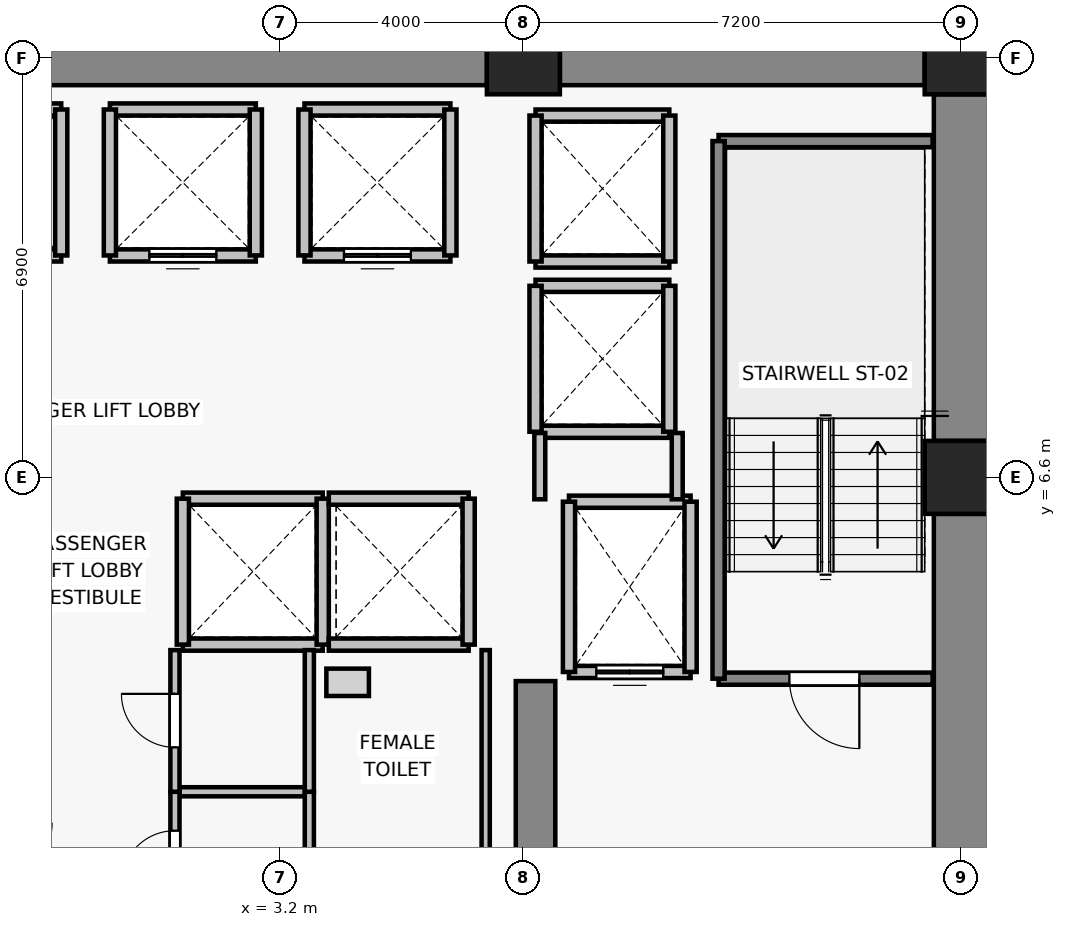
"""IFC4 building model, lengths in metres.
Left out: names, types, materials, properties, quantities, classifications, styles, units other than length and angle.
Written with IfcOpenShell. Run it as: python <this file> out.ifc"""

import sys

from ifc_helpers import new_model, si_unit, direction, frame, frame_2d, origin, origin_2d, place, context, subcontext, project, spatial, rectangle, extrude, source, transform, mapped, element, fill, save


model = new_model("IFC4")
c1 = context("Model", 3, precision=1e-05, world=origin(), true_north=direction((0.0, 1.0)))
c2 = subcontext(c1, "Body", "Model", "MODEL_VIEW")
j1 = project(units=[si_unit("LENGTHUNIT", "METRE"), si_unit("PLANEANGLEUNIT", "RADIAN")], contexts=[c1])
p1 = place(None, origin())
s1 = spatial("IfcSite", under=j1, at=p1, CompositionType="ELEMENT")
p2 = place(p1, origin())
s2 = spatial("IfcBuilding", under=s1, at=p2, CompositionType="ELEMENT")
p3 = place(p2, frame((0.0, 0.0, 30.7)))
s3 = spatial("IfcBuildingStorey", under=s2, at=p3, CompositionType="ELEMENT", Elevation=30.7)
for number, where, z_axis, x_axis in (
    (1, (14.4, 6.6, 0.0), (0.0, 0.0, 1.0), (1.0, 0.0, 0.0)),
    (2, (7.2, 13.5, 0.0), (0.0, 0.0, 1.0), (1.0, 0.0, 0.0)),
    (3, (14.4, 13.5, 0.0), (0.0, 0.0, 1.0), (1.0, 0.0, 0.0)),
):
    element("IfcColumn", number, at=place(p3, frame(where, z_axis=z_axis, x_axis=x_axis)), inside=s3, PredefinedType="COLUMN", context=c2, shape_type="SweptSolid", body=[
        extrude(rectangle(XDim=1.2, YDim=1.2, at=origin_2d()), origin(), (0.0, 0.0, 1.0), 3.3),
    ])
p4 = place(p3, frame((-6.6, 13.5, 0.0), z_axis=(0.0, 0.0, 1.0), x_axis=(1.0, 0.0, 0.0)))
e4 = element("IfcWall", 4, at=p4, inside=s3, PredefinedType="SHEAR", context=c2, shape_type="SweptSolid", body=[
    extrude(rectangle(XDim=13.2, YDim=0.9, at=frame_2d((6.6, 0.0))), origin(), (0.0, 0.0, 1.0), 3.075),
])
p5 = place(p3, frame((7.8, 13.5, 0.0), z_axis=(0.0, 0.0, 1.0), x_axis=(1.0, 0.0, 0.0)))
e5 = element("IfcWall", 5, at=p5, inside=s3, PredefinedType="SHEAR", context=c2, shape_type="SweptSolid", body=[
    extrude(rectangle(XDim=6.0, YDim=0.9, at=frame_2d((3.0, 0.0))), origin(), (0.0, 0.0, 1.0), 3.075),
])
p6 = place(p3, frame((14.4, -0.6, 0.0), z_axis=(0.0, 0.0, 1.0), x_axis=(0.0, 1.0, 0.0)))
e6 = element("IfcWall", 6, at=p6, inside=s3, PredefinedType="SHEAR", context=c2, shape_type="SweptSolid", body=[
    extrude(rectangle(XDim=6.6, YDim=0.9, at=frame_2d((3.3, 0.0))), origin(), (0.0, 0.0, 1.0), 3.075),
])
p7 = place(p3, frame((14.4, 7.2, 0.0), z_axis=(0.0, 0.0, 1.0), x_axis=(0.0, 1.0, 0.0)))
e7 = element("IfcWall", 7, at=p7, inside=s3, PredefinedType="SHEAR", context=c2, shape_type="SweptSolid", body=[
    extrude(rectangle(XDim=5.7, YDim=0.9, at=frame_2d((2.85, 0.0))), origin(), (0.0, 0.0, 1.0), 3.075),
])
p8 = place(p3, frame((7.4, -0.75, 0.0), z_axis=(0.0, 0.0, 1.0), x_axis=(0.0, 1.0, 0.0)))
e8 = element("IfcWall", 8, at=p8, inside=s3, PredefinedType="SHEAR", context=c2, shape_type="SweptSolid", body=[
    extrude(rectangle(XDim=4.0, YDim=0.65, at=frame_2d((2.0, 0.0))), origin(), (0.0, 0.0, 1.0), 3.075),
])
p9 = place(p3, frame((9.95, 3.4, 0.0), z_axis=(0.0, 0.0, 1.0), x_axis=(-1.0, 0.0, 0.0)))
e9 = element("IfcWall", 9, at=p9, inside=s3, PredefinedType="SOLIDWALL", context=c2, shape_type="SweptSolid", body=[
    extrude(rectangle(XDim=2.0, YDim=0.2, at=frame_2d((1.0, 0.0))), origin(), (0.0, 0.0, 1.0), 3.075),
])
p10 = place(p9, frame((0.45, 0.0, 0.0)))
e10 = element("IfcOpeningElement", 10, at=p10, cuts=e9, PredefinedType="OPENING", context=c2, shape_type="SweptSolid", body=[
    extrude(rectangle(XDim=1.1, YDim=2.2, at=frame_2d((0.55, 1.1))), frame((0.0, 0.11, 0.0), z_axis=(0.0, -1.0, 0.0), x_axis=(1.0, 0.0, 0.0)), (0.0, 0.0, 1.0), 0.22),
])
p11 = place(p3, frame((7.95, 6.2, 0.0), z_axis=(0.0, 0.0, 1.0), x_axis=(1.0, 0.0, 0.0)))
e11 = element("IfcWall", 11, at=p11, inside=s3, PredefinedType="SOLIDWALL", context=c2, shape_type="SweptSolid", body=[
    extrude(rectangle(XDim=2.0, YDim=0.2, at=frame_2d((1.0, 0.0))), origin(), (0.0, 0.0, 1.0), 3.075),
])
for number, where, z_axis, x_axis in (
    (12, (7.95, 3.4, 0.0), (0.0, 0.0, 1.0), (0.0, 1.0, 0.0)),
    (13, (9.95, 6.2, 0.0), (0.0, 0.0, 1.0), (0.0, -1.0, 0.0)),
):
    element("IfcWall", number, at=place(p3, frame(where, z_axis=z_axis, x_axis=x_axis)), inside=s3, PredefinedType="SOLIDWALL", context=c2, shape_type="SweptSolid", body=[
        extrude(rectangle(XDim=2.8, YDim=0.2, at=frame_2d((1.4, 0.0))), origin(), (0.0, 0.0, 1.0), 3.075),
    ])
p12 = place(p3, frame((-0.4, 10.25, 0.0), z_axis=(0.0, 0.0, 1.0), x_axis=(-1.0, 0.0, 0.0)))
e14 = element("IfcWall", 14, at=p12, inside=s3, PredefinedType="SOLIDWALL", context=c2, shape_type="SweptSolid", body=[
    extrude(rectangle(XDim=2.4, YDim=0.2, at=frame_2d((1.2, 0.0))), origin(), (0.0, 0.0, 1.0), 3.075),
])
p13 = place(p12, frame((0.65, 0.0, 0.0)))
e15 = element("IfcOpeningElement", 15, at=p13, cuts=e14, PredefinedType="OPENING", context=c2, shape_type="SweptSolid", body=[
    extrude(rectangle(XDim=1.1, YDim=2.2, at=frame_2d((0.55, 1.1))), frame((0.0, 0.11, 0.0), z_axis=(0.0, -1.0, 0.0), x_axis=(1.0, 0.0, 0.0)), (0.0, 0.0, 1.0), 0.22),
])
p14 = place(p3, frame((-2.8, 12.65, 0.0), z_axis=(0.0, 0.0, 1.0), x_axis=(1.0, 0.0, 0.0)))
e16 = element("IfcWall", 16, at=p14, inside=s3, PredefinedType="SOLIDWALL", context=c2, shape_type="SweptSolid", body=[
    extrude(rectangle(XDim=2.4, YDim=0.2, at=frame_2d((1.2, 0.0))), origin(), (0.0, 0.0, 1.0), 3.075),
])
p15 = place(p3, frame((-0.4, 12.65, 0.0), z_axis=(0.0, 0.0, 1.0), x_axis=(0.0, -1.0, 0.0)))
e17 = element("IfcWall", 17, at=p15, inside=s3, PredefinedType="SOLIDWALL", context=c2, shape_type="SweptSolid", body=[
    extrude(rectangle(XDim=2.4, YDim=0.2, at=frame_2d((1.2, 0.0))), origin(), (0.0, 0.0, 1.0), 3.075),
])
p16 = place(p3, frame((2.8, 10.25, 0.0), z_axis=(0.0, 0.0, 1.0), x_axis=(-1.0, 0.0, 0.0)))
e18 = element("IfcWall", 18, at=p16, inside=s3, PredefinedType="SOLIDWALL", context=c2, shape_type="SweptSolid", body=[
    extrude(rectangle(XDim=2.4, YDim=0.2, at=frame_2d((1.2, 0.0))), origin(), (0.0, 0.0, 1.0), 3.075),
])
p17 = place(p16, frame((0.65, 0.0, 0.0)))
e19 = element("IfcOpeningElement", 19, at=p17, cuts=e18, PredefinedType="OPENING", context=c2, shape_type="SweptSolid", body=[
    extrude(rectangle(XDim=1.1, YDim=2.2, at=frame_2d((0.55, 1.1))), frame((0.0, 0.11, 0.0), z_axis=(0.0, -1.0, 0.0), x_axis=(1.0, 0.0, 0.0)), (0.0, 0.0, 1.0), 0.22),
])
p18 = place(p3, frame((0.4, 12.65, 0.0), z_axis=(0.0, 0.0, 1.0), x_axis=(1.0, 0.0, 0.0)))
e20 = element("IfcWall", 20, at=p18, inside=s3, PredefinedType="SOLIDWALL", context=c2, shape_type="SweptSolid", body=[
    extrude(rectangle(XDim=2.4, YDim=0.2, at=frame_2d((1.2, 0.0))), origin(), (0.0, 0.0, 1.0), 3.075),
])
for number, where, z_axis, x_axis in (
    (21, (0.4, 10.25, 0.0), (0.0, 0.0, 1.0), (0.0, 1.0, 0.0)),
    (22, (2.8, 12.65, 0.0), (0.0, 0.0, 1.0), (0.0, -1.0, 0.0)),
):
    element("IfcWall", number, at=place(p3, frame(where, z_axis=z_axis, x_axis=x_axis)), inside=s3, PredefinedType="SOLIDWALL", context=c2, shape_type="SweptSolid", body=[
        extrude(rectangle(XDim=2.4, YDim=0.2, at=frame_2d((1.2, 0.0))), origin(), (0.0, 0.0, 1.0), 3.075),
    ])
p19 = place(p3, frame((6.0, 10.25, 0.0), z_axis=(0.0, 0.0, 1.0), x_axis=(-1.0, 0.0, 0.0)))
e23 = element("IfcWall", 23, at=p19, inside=s3, PredefinedType="SOLIDWALL", context=c2, shape_type="SweptSolid", body=[
    extrude(rectangle(XDim=2.4, YDim=0.2, at=frame_2d((1.2, 0.0))), origin(), (0.0, 0.0, 1.0), 3.075),
])
p20 = place(p19, frame((0.65, 0.0, 0.0)))
e24 = element("IfcOpeningElement", 24, at=p20, cuts=e23, PredefinedType="OPENING", context=c2, shape_type="SweptSolid", body=[
    extrude(rectangle(XDim=1.1, YDim=2.2, at=frame_2d((0.55, 1.1))), frame((0.0, 0.11, 0.0), z_axis=(0.0, -1.0, 0.0), x_axis=(1.0, 0.0, 0.0)), (0.0, 0.0, 1.0), 0.22),
])
for number, where, z_axis, x_axis in (
    (25, (3.6, 12.65, 0.0), (0.0, 0.0, 1.0), (1.0, 0.0, 0.0)),
    (26, (3.6, 10.25, 0.0), (0.0, 0.0, 1.0), (0.0, 1.0, 0.0)),
    (27, (6.0, 12.65, 0.0), (0.0, 0.0, 1.0), (0.0, -1.0, 0.0)),
):
    element("IfcWall", number, at=place(p3, frame(where, z_axis=z_axis, x_axis=x_axis)), inside=s3, PredefinedType="SOLIDWALL", context=c2, shape_type="SweptSolid", body=[
        extrude(rectangle(XDim=2.4, YDim=0.2, at=frame_2d((1.2, 0.0))), origin(), (0.0, 0.0, 1.0), 3.075),
    ])
for number, where, z_axis, x_axis in (
    (28, (3.9, 3.85, 0.0), (0.0, 0.0, 1.0), (-1.0, 0.0, 0.0)),
    (29, (1.6, 6.25, 0.0), (0.0, 0.0, 1.0), (1.0, 0.0, 0.0)),
):
    element("IfcWall", number, at=place(p3, frame(where, z_axis=z_axis, x_axis=x_axis)), inside=s3, PredefinedType="SOLIDWALL", context=c2, shape_type="SweptSolid", body=[
        extrude(rectangle(XDim=2.3, YDim=0.2, at=frame_2d((1.15, 0.0))), origin(), (0.0, 0.0, 1.0), 3.075),
    ])
for number, where, z_axis, x_axis in (
    (30, (1.6, 3.85, 0.0), (0.0, 0.0, 1.0), (0.0, 1.0, 0.0)),
    (31, (3.9, 6.25, 0.0), (0.0, 0.0, 1.0), (0.0, -1.0, 0.0)),
):
    element("IfcWall", number, at=place(p3, frame(where, z_axis=z_axis, x_axis=x_axis)), inside=s3, PredefinedType="SOLIDWALL", context=c2, shape_type="SweptSolid", body=[
        extrude(rectangle(XDim=2.4, YDim=0.2, at=frame_2d((1.2, 0.0))), origin(), (0.0, 0.0, 1.0), 3.075),
    ])
for number, where, z_axis, x_axis in (
    (32, (6.3, 3.85, 0.0), (0.0, 0.0, 1.0), (-1.0, 0.0, 0.0)),
    (33, (4.0, 6.25, 0.0), (0.0, 0.0, 1.0), (1.0, 0.0, 0.0)),
):
    element("IfcWall", number, at=place(p3, frame(where, z_axis=z_axis, x_axis=x_axis)), inside=s3, PredefinedType="SOLIDWALL", context=c2, shape_type="SweptSolid", body=[
        extrude(rectangle(XDim=2.3, YDim=0.2, at=frame_2d((1.15, 0.0))), origin(), (0.0, 0.0, 1.0), 3.075),
    ])
p21 = place(p3, frame((6.3, 6.25, 0.0), z_axis=(0.0, 0.0, 1.0), x_axis=(0.0, -1.0, 0.0)))
e34 = element("IfcWall", 34, at=p21, inside=s3, PredefinedType="SOLIDWALL", context=c2, shape_type="SweptSolid", body=[
    extrude(rectangle(XDim=2.4, YDim=0.2, at=frame_2d((1.2, 0.0))), origin(), (0.0, 0.0, 1.0), 3.075),
])
for number, where, z_axis, x_axis in (
    (35, (9.6, 7.35, 0.0), (0.0, 0.0, 1.0), (-1.0, 0.0, 0.0)),
    (36, (7.4, 9.75, 0.0), (0.0, 0.0, 1.0), (1.0, 0.0, 0.0)),
):
    element("IfcWall", number, at=place(p3, frame(where, z_axis=z_axis, x_axis=x_axis)), inside=s3, PredefinedType="SOLIDWALL", context=c2, shape_type="SweptSolid", body=[
        extrude(rectangle(XDim=2.2, YDim=0.2, at=frame_2d((1.1, 0.0))), origin(), (0.0, 0.0, 1.0), 2.465),
    ])
p22 = place(p3, frame((7.4, 7.35, 0.0), z_axis=(0.0, 0.0, 1.0), x_axis=(0.0, 1.0, 0.0)))
e37 = element("IfcWall", 37, at=p22, inside=s3, PredefinedType="SOLIDWALL", context=c2, shape_type="SweptSolid", body=[
    extrude(rectangle(XDim=2.4, YDim=0.2, at=frame_2d((1.2, 0.0))), origin(), (0.0, 0.0, 1.0), 2.465),
])
p23 = place(p3, frame((9.6, 9.75, 0.0), z_axis=(0.0, 0.0, 1.0), x_axis=(0.0, -1.0, 0.0)))
e38 = element("IfcWall", 38, at=p23, inside=s3, PredefinedType="SOLIDWALL", context=c2, shape_type="SweptSolid", body=[
    extrude(rectangle(XDim=2.4, YDim=0.2, at=frame_2d((1.2, 0.0))), origin(), (0.0, 0.0, 1.0), 3.075),
])
for number, where, z_axis, x_axis in (
    (39, (9.6, 10.15, 0.0), (0.0, 0.0, 1.0), (-1.0, 0.0, 0.0)),
    (40, (7.4, 12.55, 0.0), (0.0, 0.0, 1.0), (1.0, 0.0, 0.0)),
):
    element("IfcWall", number, at=place(p3, frame(where, z_axis=z_axis, x_axis=x_axis)), inside=s3, PredefinedType="SOLIDWALL", context=c2, shape_type="SweptSolid", body=[
        extrude(rectangle(XDim=2.2, YDim=0.2, at=frame_2d((1.1, 0.0))), origin(), (0.0, 0.0, 1.0), 2.465),
    ])
p24 = place(p3, frame((7.4, 10.15, 0.0), z_axis=(0.0, 0.0, 1.0), x_axis=(0.0, 1.0, 0.0)))
e41 = element("IfcWall", 41, at=p24, inside=s3, PredefinedType="SOLIDWALL", context=c2, shape_type="SweptSolid", body=[
    extrude(rectangle(XDim=2.4, YDim=0.2, at=frame_2d((1.2, 0.0))), origin(), (0.0, 0.0, 1.0), 2.465),
])
p25 = place(p3, frame((9.6, 12.55, 0.0), z_axis=(0.0, 0.0, 1.0), x_axis=(0.0, -1.0, 0.0)))
e42 = element("IfcWall", 42, at=p25, inside=s3, PredefinedType="SOLIDWALL", context=c2, shape_type="SweptSolid", body=[
    extrude(rectangle(XDim=2.4, YDim=0.2, at=frame_2d((1.2, 0.0))), origin(), (0.0, 0.0, 1.0), 3.075),
])
p26 = place(p3, frame((13.93, 3.29, 0.0), z_axis=(0.0, 0.0, 1.0), x_axis=(-1.0, 0.0, 0.0)))
e43 = element("IfcWall", 43, at=p26, inside=s3, PredefinedType="SOLIDWALL", context=c2, shape_type="SweptSolid", body=[
    extrude(rectangle(XDim=3.52, YDim=0.2, at=frame_2d((1.76, 0.0))), origin(), (0.0, 0.0, 1.0), 3.075),
])
p27 = place(p26, frame((1.205, 0.0, 0.0)))
e44 = element("IfcOpeningElement", 44, at=p27, cuts=e43, PredefinedType="OPENING", context=c2, shape_type="SweptSolid", body=[
    extrude(rectangle(XDim=1.15, YDim=2.15, at=frame_2d((0.575, 1.075))), frame((0.0, 0.11, 0.0), z_axis=(0.0, -1.0, 0.0), x_axis=(1.0, 0.0, 0.0)), (0.0, 0.0, 1.0), 0.22),
])
p28 = place(p3, frame((10.41, 12.13, 0.0), z_axis=(0.0, 0.0, 1.0), x_axis=(1.0, 0.0, 0.0)))
e45 = element("IfcWall", 45, at=p28, inside=s3, PredefinedType="SOLIDWALL", context=c2, shape_type="SweptSolid", body=[
    extrude(rectangle(XDim=3.52, YDim=0.2, at=frame_2d((1.76, 0.0))), origin(), (0.0, 0.0, 1.0), 3.075),
])
p29 = place(p3, frame((10.41, 3.29, 0.0), z_axis=(0.0, 0.0, 1.0), x_axis=(0.0, 1.0, 0.0)))
e46 = element("IfcWall", 46, at=p29, inside=s3, PredefinedType="SOLIDWALL", context=c2, shape_type="SweptSolid", body=[
    extrude(rectangle(XDim=8.84, YDim=0.2, at=frame_2d((4.42, 0.0))), origin(), (0.0, 0.0, 1.0), 3.075),
])
p30 = place(p3, frame((7.47, 6.24, 0.0), z_axis=(0.0, 0.0, 1.0), x_axis=(0.0, 1.0, 0.0)))
e47 = element("IfcWall", 47, at=p30, inside=s3, PredefinedType="PARTITIONING", context=c2, shape_type="SweptSolid", body=[
    extrude(rectangle(XDim=1.09, YDim=0.18, at=frame_2d((0.545, 0.0))), origin(), (0.0, 0.0, 1.0), 2.465),
])
p31 = place(p3, frame((9.73, 7.33, 0.0), z_axis=(0.0, 0.0, 1.0), x_axis=(0.0, -1.0, 0.0)))
e48 = element("IfcWall", 48, at=p31, inside=s3, PredefinedType="PARTITIONING", context=c2, shape_type="SweptSolid", body=[
    extrude(rectangle(XDim=1.09, YDim=0.18, at=frame_2d((0.545, 0.0))), origin(), (0.0, 0.0, 1.0), 3.075),
])
p32 = place(p3, frame((1.47, 1.43, 0.0), z_axis=(0.0, 0.0, 1.0), x_axis=(1.0, 0.0, 0.0)))
e49 = element("IfcWall", 49, at=p32, inside=s3, PredefinedType="PARTITIONING", context=c2, shape_type="SweptSolid", body=[
    extrude(rectangle(XDim=2.21, YDim=0.15, at=frame_2d((1.105, 0.0))), origin(), (0.0, 0.0, 1.0), 3.075),
])
p33 = place(p3, frame((1.47, -0.73, 0.0), z_axis=(0.0, 0.0, 1.0), x_axis=(0.0, 1.0, 0.0)))
e50 = element("IfcWall", 50, at=p33, inside=s3, PredefinedType="PARTITIONING", context=c2, shape_type="SweptSolid", body=[
    extrude(rectangle(XDim=2.16, YDim=0.15, at=frame_2d((1.08, 0.0))), origin(), (0.0, 0.0, 1.0), 3.075),
])
p34 = place(p33, frame((0.64, 0.0, 0.0)))
e51 = element("IfcOpeningElement", 51, at=p34, cuts=e50, PredefinedType="OPENING", context=c2, shape_type="SweptSolid", body=[
    extrude(rectangle(XDim=0.88, YDim=2.1, at=frame_2d((0.44, 1.05))), frame((0.0, 0.085, 0.0), z_axis=(0.0, -1.0, 0.0), x_axis=(1.0, 0.0, 0.0)), (0.0, 0.0, 1.0), 0.17),
])
p35 = place(p3, frame((3.68, 1.43, 0.0), z_axis=(0.0, 0.0, 1.0), x_axis=(0.0, -1.0, 0.0)))
e52 = element("IfcWall", 52, at=p35, inside=s3, PredefinedType="PARTITIONING", context=c2, shape_type="SweptSolid", body=[
    extrude(rectangle(XDim=2.16, YDim=0.15, at=frame_2d((1.08, 0.0))), origin(), (0.0, 0.0, 1.0), 3.075),
])
p36 = place(p3, frame((1.47, 1.43, 0.0), z_axis=(0.0, 0.0, 1.0), x_axis=(0.0, 1.0, 0.0)))
e53 = element("IfcWall", 53, at=p36, inside=s3, PredefinedType="PARTITIONING", context=c2, shape_type="SweptSolid", body=[
    extrude(rectangle(XDim=2.33, YDim=0.15, at=frame_2d((1.165, 0.0))), origin(), (0.0, 0.0, 1.0), 3.075),
])
p37 = place(p36, frame((0.73, 0.0, 0.0)))
e54 = element("IfcOpeningElement", 54, at=p37, cuts=e53, PredefinedType="OPENING", context=c2, shape_type="SweptSolid", body=[
    extrude(rectangle(XDim=0.88, YDim=2.15, at=frame_2d((0.44, 1.075))), frame((0.0, 0.085, 0.0), z_axis=(0.0, -1.0, 0.0), x_axis=(1.0, 0.0, 0.0)), (0.0, 0.0, 1.0), 0.17),
])
p38 = place(p3, frame((3.68, 3.76, 0.0), z_axis=(0.0, 0.0, 1.0), x_axis=(0.0, -1.0, 0.0)))
e55 = element("IfcWall", 55, at=p38, inside=s3, PredefinedType="PARTITIONING", context=c2, shape_type="SweptSolid", body=[
    extrude(rectangle(XDim=2.33, YDim=0.15, at=frame_2d((1.165, 0.0))), origin(), (0.0, 0.0, 1.0), 3.075),
])
p39 = place(p3, frame((6.58, 3.76, 0.0), z_axis=(0.0, 0.0, 1.0), x_axis=(0.0, -1.0, 0.0)))
e56 = element("IfcWall", 56, at=p39, inside=s3, PredefinedType="PARTITIONING", context=c2, shape_type="SweptSolid", body=[
    extrude(rectangle(XDim=4.49, YDim=0.135, at=frame_2d((2.245, 0.0))), origin(), (0.0, 0.0, 1.0), 3.075),
])
m1 = source(origin(), c2, "Body", "SweptSolid", [
    extrude(rectangle(XDim=1.1, YDim=2.2, at=frame_2d((0.55, 1.1))), frame((0.0, 0.025, 0.0), z_axis=(0.0, -1.0, 0.0), x_axis=(1.0, 0.0, 0.0)), (0.0, 0.0, 1.0), 0.05),
])
p40 = place(p10, origin())
e57 = element("IfcDoor", 57, at=p40, inside=s3, OperationType="DOUBLE_DOOR_SLIDING", PredefinedType="DOOR", context=c2, shape_type="MappedRepresentation", body=[
    mapped(m1, transform((0.0, 0.0, 0.0), x_axis=(1.0, 0.0, 0.0), y_axis=(0.0, 1.0, 0.0), z_axis=(0.0, 0.0, 1.0), scale=1.0)),
])
fill(e10, e57)
p41 = place(p17, origin())
e58 = element("IfcDoor", 58, at=p41, inside=s3, OperationType="DOUBLE_DOOR_SLIDING", PredefinedType="DOOR", context=c2, shape_type="MappedRepresentation", body=[
    mapped(m1, transform((0.0, 0.0, 0.0), x_axis=(1.0, 0.0, 0.0), y_axis=(0.0, 1.0, 0.0), z_axis=(0.0, 0.0, 1.0), scale=1.0)),
])
fill(e19, e58)
p42 = place(p20, origin())
e59 = element("IfcDoor", 59, at=p42, inside=s3, OperationType="DOUBLE_DOOR_SLIDING", PredefinedType="DOOR", context=c2, shape_type="MappedRepresentation", body=[
    mapped(m1, transform((0.0, 0.0, 0.0), x_axis=(1.0, 0.0, 0.0), y_axis=(0.0, 1.0, 0.0), z_axis=(0.0, 0.0, 1.0), scale=1.0)),
])
fill(e24, e59)
m2 = source(origin(), c2, "Body", "SweptSolid", [
    extrude(rectangle(XDim=1.15, YDim=2.15, at=frame_2d((0.575, 1.075))), frame((0.0, 0.025, 0.0), z_axis=(0.0, -1.0, 0.0), x_axis=(1.0, 0.0, 0.0)), (0.0, 0.0, 1.0), 0.05),
])
p43 = place(p27, origin())
e60 = element("IfcDoor", 60, at=p43, inside=s3, OperationType="SINGLE_SWING_LEFT", PredefinedType="DOOR", context=c2, shape_type="MappedRepresentation", body=[
    mapped(m2, transform((0.0, 0.0, 0.0), x_axis=(1.0, 0.0, 0.0), y_axis=(0.0, 1.0, 0.0), z_axis=(0.0, 0.0, 1.0), scale=1.0)),
])
fill(e44, e60)
m3 = source(origin(), c2, "Body", "SweptSolid", [
    extrude(rectangle(XDim=0.88, YDim=2.1, at=frame_2d((0.44, 1.05))), frame((0.0, 0.025, 0.0), z_axis=(0.0, -1.0, 0.0), x_axis=(1.0, 0.0, 0.0)), (0.0, 0.0, 1.0), 0.05),
])
p44 = place(p34, origin())
e61 = element("IfcDoor", 61, at=p44, inside=s3, OperationType="SINGLE_SWING_LEFT", PredefinedType="DOOR", context=c2, shape_type="MappedRepresentation", body=[
    mapped(m3, transform((0.0, 0.0, 0.0), x_axis=(1.0, 0.0, 0.0), y_axis=(0.0, 1.0, 0.0), z_axis=(0.0, 0.0, 1.0), scale=1.0)),
])
fill(e51, e61)
m4 = source(origin(), c2, "Body", "SweptSolid", [
    extrude(rectangle(XDim=0.88, YDim=2.15, at=frame_2d((0.44, 1.075))), frame((0.0, 0.025, 0.0), z_axis=(0.0, -1.0, 0.0), x_axis=(1.0, 0.0, 0.0)), (0.0, 0.0, 1.0), 0.05),
])
p45 = place(p37, origin())
e62 = element("IfcDoor", 62, at=p45, inside=s3, OperationType="SINGLE_SWING_RIGHT", PredefinedType="DOOR", context=c2, shape_type="MappedRepresentation", body=[
    mapped(m4, transform((0.0, 0.0, 0.0), x_axis=(1.0, 0.0, 0.0), y_axis=(0.0, 1.0, 0.0), z_axis=(0.0, 0.0, 1.0), scale=1.0)),
])
fill(e54, e62)
save(model, sys.argv[1])
